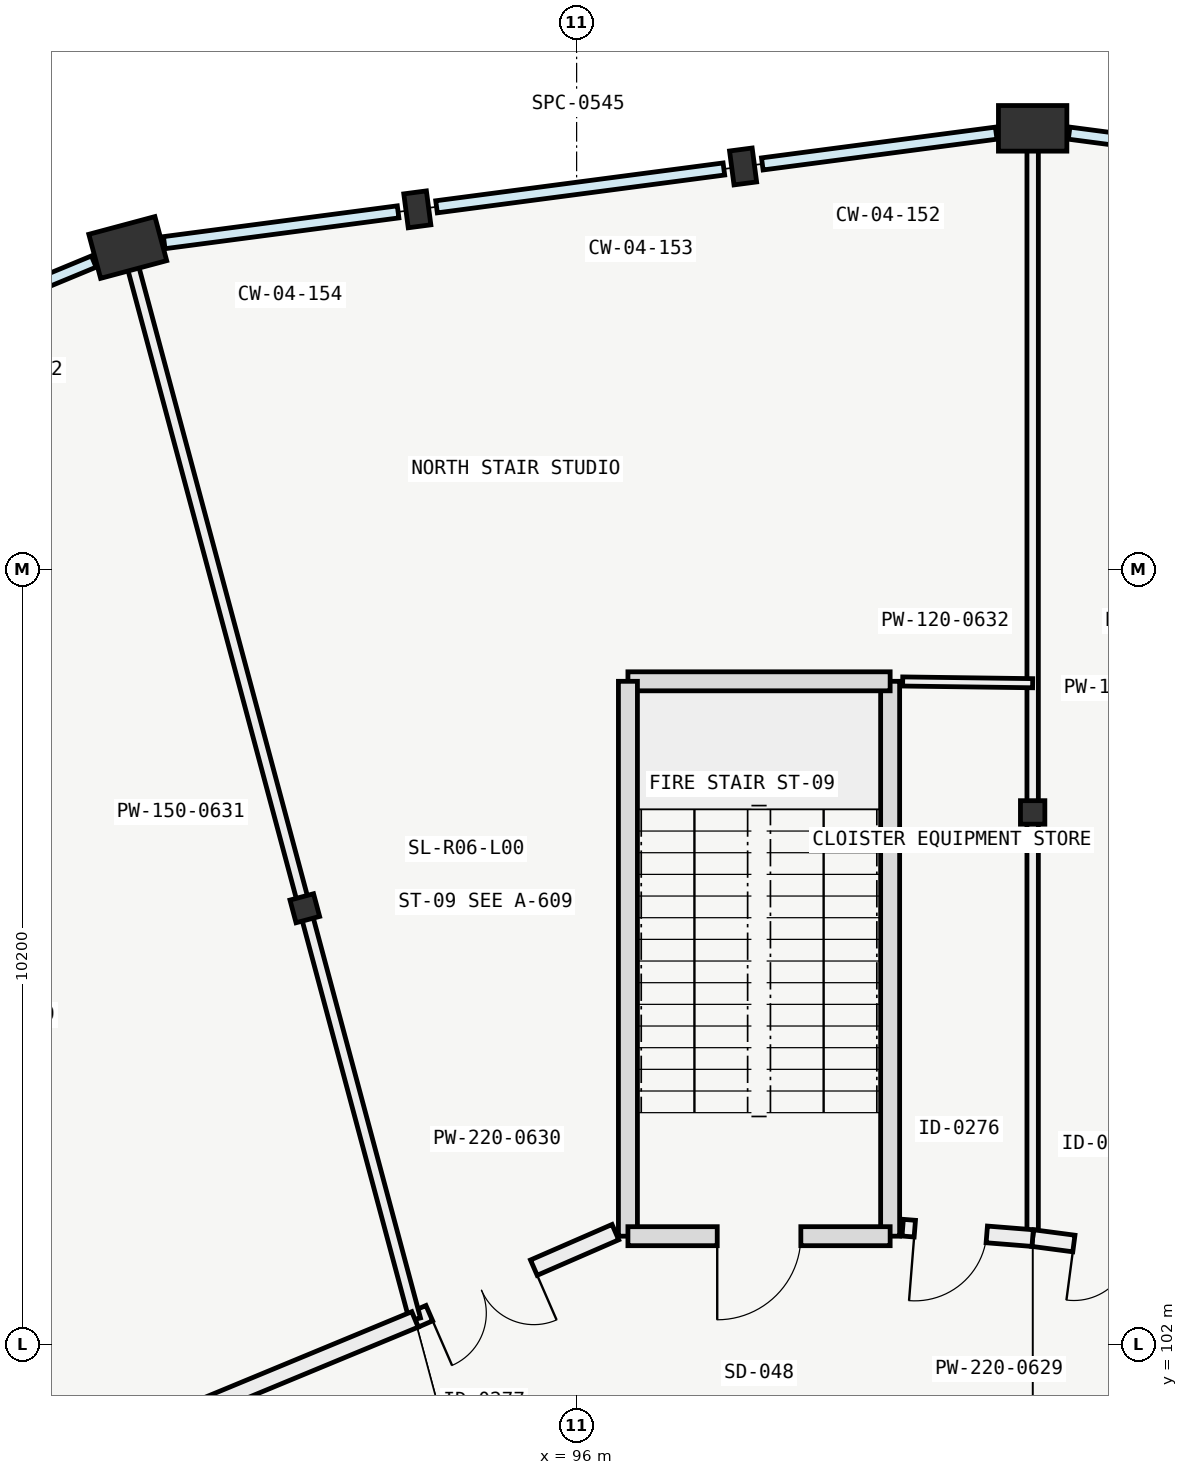
"""IFC4 building model, lengths in metres.
Left out: names, types, materials, properties, quantities, classifications, styles, units other than length and angle.
Written with IfcOpenShell. Run it as: python <this file> out.ifc"""

import sys

from ifc_helpers import new_model, si_unit, direction, frame, frame_2d, origin, origin_2d, place, context, subcontext, project, spatial, rectangle, i_section, extrude, element, fill, save


model = new_model("IFC4")
c1 = context("Model", 3, precision=1e-05, world=origin(), true_north=direction((0.0, 1.0)))
c2 = subcontext(c1, "Body", "Model", "MODEL_VIEW")
j1 = project(units=[si_unit("LENGTHUNIT", "METRE"), si_unit("PLANEANGLEUNIT", "RADIAN")], contexts=[c1])
p1 = place(None, origin())
s1 = spatial("IfcSite", under=j1, at=p1, CompositionType="ELEMENT")
p2 = place(p1, origin())
s2 = spatial("IfcBuilding", under=s1, at=p2, CompositionType="ELEMENT")
p3 = place(p2, origin())
s3 = spatial("IfcBuildingStorey", under=s2, at=p3, CompositionType="ELEMENT", Elevation=0.0)
p4 = place(p3, frame((102.0, 109.0, -0.4), z_axis=(0.0, 0.0, 1.0), x_axis=(0.0, 1.0, 0.0)))
e1 = element("IfcColumn", 1, at=p4, inside=s3, PredefinedType="COLUMN", context=c2, shape_type="SweptSolid", body=[
    extrude(i_section(OverallWidth=0.309, OverallDepth=0.321, WebThickness=0.014, FlangeThickness=0.022, FilletRadius=0.017, at=origin_2d()), origin(), (0.0, 0.0, 1.0), 5.8),
])
p5 = place(p3, frame((102.0, 118.0, -0.4), z_axis=(0.0, 0.0, 1.0), x_axis=(0.0, 1.0, 0.0)))
e2 = element("IfcColumn", 2, at=p5, inside=s3, PredefinedType="COLUMN", context=c2, shape_type="SweptSolid", body=[
    extrude(rectangle(XDim=0.6, YDim=0.9, at=origin_2d()), origin(), (0.0, 0.0, 1.0), 5.8),
])
p6 = place(p3, frame((92.424, 107.739, -0.4), z_axis=(0.0, 0.0, 1.0), x_axis=(-0.258819045103, 0.965925826289, 0.0)))
e3 = element("IfcColumn", 3, at=p6, inside=s3, PredefinedType="COLUMN", context=c2, shape_type="SweptSolid", body=[
    extrude(i_section(OverallWidth=0.309, OverallDepth=0.321, WebThickness=0.014, FlangeThickness=0.022, FilletRadius=0.017, at=origin_2d()), origin(), (0.0, 0.0, 1.0), 5.8),
])
p7 = place(p3, frame((90.094, 116.433, -0.4), z_axis=(0.0, 0.0, 1.0), x_axis=(-0.258819045103, 0.965925826289, 0.0)))
e4 = element("IfcColumn", 4, at=p7, inside=s3, PredefinedType="COLUMN", context=c2, shape_type="SweptSolid", body=[
    extrude(rectangle(XDim=0.6, YDim=0.9, at=origin_2d()), origin(), (0.0, 0.0, 1.0), 5.8),
])
for number, where, z_axis, x_axis in (
    (5, (98.19, 117.498, -0.4), (0.0, 0.0, 1.0), (0.991, 0.131, 0.0)),
    (6, (93.904, 116.934, -0.4), (0.0, 0.0, 1.0), (0.991, 0.131, 0.0)),
):
    element("IfcColumn", number, at=place(p3, frame(where, z_axis=z_axis, x_axis=x_axis)), inside=s3, PredefinedType="PILASTER", context=c2, shape_type="SweptSolid", body=[
        extrude(rectangle(XDim=0.3, YDim=0.45, at=origin_2d()), origin(), (0.0, 0.0, 1.0), 5.8),
    ])
p8 = place(p3, frame((100.125, 103.425, -0.4), z_axis=(0.0, 0.0, 1.0), x_axis=(0.0, 1.0, 0.0)))
e7 = element("IfcWall", 7, at=p8, inside=s3, PredefinedType="SOLIDWALL", context=c2, shape_type="SweptSolid", body=[
    extrude(rectangle(XDim=7.3, YDim=0.25, at=frame_2d((3.65, 0.0))), origin(), (0.0, 0.0, 1.0), 5.52),
])
p9 = place(p3, frame((100.125, 110.725, -0.4), z_axis=(0.0, 0.0, 1.0), x_axis=(-1.0, 0.0, 0.0)))
e8 = element("IfcWall", 8, at=p9, inside=s3, PredefinedType="SOLIDWALL", context=c2, shape_type="SweptSolid", body=[
    extrude(rectangle(XDim=3.45, YDim=0.25, at=frame_2d((1.725, 0.0))), origin(), (0.0, 0.0, 1.0), 5.52),
])
p10 = place(p3, frame((96.675, 110.725, -0.4), z_axis=(0.0, 0.0, 1.0), x_axis=(0.0, -1.0, 0.0)))
e9 = element("IfcWall", 9, at=p10, inside=s3, PredefinedType="SOLIDWALL", context=c2, shape_type="SweptSolid", body=[
    extrude(rectangle(XDim=7.3, YDim=0.25, at=frame_2d((3.65, 0.0))), origin(), (0.0, 0.0, 1.0), 5.52),
])
p11 = place(p3, frame((100.125, 103.425, -0.4), z_axis=(0.0, 0.0, 1.0), x_axis=(-1.0, 0.0, 0.0)))
e10 = element("IfcWall", 10, at=p11, inside=s3, PredefinedType="SOLIDWALL", context=c2, shape_type="SweptSolid", body=[
    extrude(rectangle(XDim=3.45, YDim=0.25, at=frame_2d((1.725, 0.0))), origin(), (0.0, 0.0, 1.0), 5.52),
])
p12 = place(p11, frame((1.175, 0.0, 0.4)))
e11 = element("IfcOpeningElement", 11, at=p12, cuts=e10, PredefinedType="OPENING", context=c2, shape_type="SweptSolid", body=[
    extrude(rectangle(XDim=1.1, YDim=2.2, at=frame_2d((0.55, 1.1))), frame((0.0, 0.135, 0.0), z_axis=(0.0, -1.0, 0.0), x_axis=(1.0, 0.0, 0.0)), (0.0, 0.0, 1.0), 0.27),
])
p13 = place(p3, frame((102.0, 103.4, 0.0), z_axis=(0.0, 0.0, 1.0), x_axis=(0.0, 1.0, 0.0)))
e12 = element("IfcWall", 12, at=p13, inside=s3, PredefinedType="PARTITIONING", context=c2, shape_type="SweptSolid", body=[
    extrude(rectangle(XDim=14.48, YDim=0.15, at=frame_2d((7.24, 0.0))), origin(), (0.0, 0.0, 1.0), 4.567),
])
p14 = place(p3, frame((110.127, 102.33, 0.0), z_axis=(0.0, 0.0, 1.0), x_axis=(-0.991446589332, 0.130513066404, 0.0)))
e13 = element("IfcWall", 13, at=p14, inside=s3, PredefinedType="PARTITIONING", context=c2, shape_type="SweptSolid", body=[
    extrude(rectangle(XDim=8.197, YDim=0.22, at=frame_2d((4.099, 0.0))), origin(), (0.0, 0.0, 1.0), 4.567),
])
p15 = place(p14, frame((2.05, 0.0, 0.0)))
e14 = element("IfcOpeningElement", 14, at=p15, cuts=e13, PredefinedType="OPENING", context=c2, shape_type="SweptSolid", body=[
    extrude(rectangle(XDim=0.9, YDim=2.05, at=frame_2d((0.45, 1.025))), frame((0.0, 0.12, 0.0), z_axis=(0.0, -1.0, 0.0), x_axis=(1.0, 0.0, 0.0)), (0.0, 0.0, 1.0), 0.24),
])
p16 = place(p14, frame((6.15, 0.0, 0.0)))
e15 = element("IfcOpeningElement", 15, at=p16, cuts=e13, PredefinedType="OPENING", context=c2, shape_type="SweptSolid", body=[
    extrude(rectangle(XDim=1.5, YDim=2.2, at=frame_2d((0.75, 1.1))), frame((0.0, 0.12, 0.0), z_axis=(0.0, -1.0, 0.0), x_axis=(1.0, 0.0, 0.0)), (0.0, 0.0, 1.0), 0.24),
])
p17 = place(p3, frame((102.0, 103.4, 0.0), z_axis=(0.0, 0.0, 1.0), x_axis=(-0.996807580938, 0.07984138391, 0.0)))
e16 = element("IfcWall", 16, at=p17, inside=s3, PredefinedType="PARTITIONING", context=c2, shape_type="SweptSolid", body=[
    extrude(rectangle(XDim=1.715, YDim=0.22, at=frame_2d((0.858, 0.0))), origin(), (0.0, 0.0, 1.0), 4.567),
])
p18 = place(p17, frame((0.605, 0.0, 0.0)))
e17 = element("IfcOpeningElement", 17, at=p18, cuts=e16, PredefinedType="OPENING", context=c2, shape_type="SweptSolid", body=[
    extrude(rectangle(XDim=0.95, YDim=2.1, at=frame_2d((0.475, 1.05))), frame((0.0, 0.12, 0.0), z_axis=(0.0, -1.0, 0.0), x_axis=(1.0, 0.0, 0.0)), (0.0, 0.0, 1.0), 0.24),
])
p19 = place(p3, frame((96.51, 103.478, 0.0), z_axis=(0.0, 0.0, 1.0), x_axis=(-0.916855346374, -0.399219580964, 0.0)))
e18 = element("IfcWall", 18, at=p19, inside=s3, PredefinedType="PARTITIONING", context=c2, shape_type="SweptSolid", body=[
    extrude(rectangle(XDim=2.876, YDim=0.22, at=frame_2d((1.438, 0.0))), origin(), (0.0, 0.0, 1.0), 4.567),
])
p20 = place(p19, frame((1.17, 0.0, 0.0)))
e19 = element("IfcOpeningElement", 19, at=p20, cuts=e18, PredefinedType="OPENING", context=c2, shape_type="SweptSolid", body=[
    extrude(rectangle(XDim=1.5, YDim=2.2, at=frame_2d((0.75, 1.1))), frame((0.0, 0.12, 0.0), z_axis=(0.0, -1.0, 0.0), x_axis=(1.0, 0.0, 0.0)), (0.0, 0.0, 1.0), 0.24),
])
p21 = place(p3, frame((93.873, 102.33, 0.0), z_axis=(0.0, 0.0, 1.0), x_axis=(-0.258810530041, 0.965928107853, 0.0)))
e20 = element("IfcWall", 20, at=p21, inside=s3, PredefinedType="PARTITIONING", context=c2, shape_type="SweptSolid", body=[
    extrude(rectangle(XDim=14.48, YDim=0.15, at=frame_2d((7.24, 0.0))), origin(), (0.0, 0.0, 1.0), 4.567),
])
p22 = place(p3, frame((100.29, 110.723, 0.0), z_axis=(0.0, 0.0, 1.0), x_axis=(0.999909951855, -0.013419693814, 0.0)))
e21 = element("IfcWall", 21, at=p22, inside=s3, PredefinedType="PARTITIONING", context=c2, shape_type="SweptSolid", body=[
    extrude(rectangle(XDim=1.71, YDim=0.12, at=frame_2d((0.855, 0.0))), origin(), (0.0, 0.0, 1.0), 4.567),
])
p23 = place(p3, frame((93.873, 102.33, 0.0), z_axis=(0.0, 0.0, 1.0), x_axis=(-0.923874167149, -0.382696385238, 0.0)))
e22 = element("IfcWall", 22, at=p23, inside=s3, PredefinedType="PARTITIONING", context=c2, shape_type="SweptSolid", body=[
    extrude(rectangle(XDim=8.197, YDim=0.22, at=frame_2d((4.099, 0.0))), origin(), (0.0, 0.0, 1.0), 4.567),
])
p24 = place(p23, frame((4.1, 0.0, 0.0)))
e23 = element("IfcOpeningElement", 23, at=p24, cuts=e22, PredefinedType="OPENING", context=c2, shape_type="SweptSolid", body=[
    extrude(rectangle(XDim=1.5, YDim=2.2, at=frame_2d((0.75, 1.1))), frame((0.0, 0.12, 0.0), z_axis=(0.0, -1.0, 0.0), x_axis=(1.0, 0.0, 0.0)), (0.0, 0.0, 1.0), 0.24),
])
p25 = place(p12, origin())
e24 = element("IfcDoor", 24, at=p25, inside=s3, OperationType="SINGLE_SWING_RIGHT", PredefinedType="DOOR", context=c2, shape_type="SweptSolid", body=[
    extrude(rectangle(XDim=1.1, YDim=2.2, at=frame_2d((0.55, 1.1))), frame((0.0, 0.025, 0.0), z_axis=(0.0, -1.0, 0.0), x_axis=(1.0, 0.0, 0.0)), (0.0, 0.0, 1.0), 0.05),
])
fill(e11, e24)
p26 = place(p16, origin())
e25 = element("IfcDoor", 25, at=p26, inside=s3, OperationType="DOUBLE_DOOR_SINGLE_SWING", PredefinedType="DOOR", context=c2, shape_type="SweptSolid", body=[
    extrude(rectangle(XDim=1.5, YDim=2.2, at=frame_2d((0.75, 1.1))), frame((0.0, 0.025, 0.0), z_axis=(0.0, -1.0, 0.0), x_axis=(1.0, 0.0, 0.0)), (0.0, 0.0, 1.0), 0.05),
])
fill(e15, e25)
p27 = place(p18, origin())
e26 = element("IfcDoor", 26, at=p27, inside=s3, OperationType="SINGLE_SWING_RIGHT", PredefinedType="DOOR", context=c2, shape_type="SweptSolid", body=[
    extrude(rectangle(XDim=0.95, YDim=2.1, at=frame_2d((0.475, 1.05))), frame((0.0, 0.025, 0.0), z_axis=(0.0, -1.0, 0.0), x_axis=(1.0, 0.0, 0.0)), (0.0, 0.0, 1.0), 0.05),
])
fill(e17, e26)
p28 = place(p20, origin())
e27 = element("IfcDoor", 27, at=p28, inside=s3, OperationType="DOUBLE_DOOR_SINGLE_SWING", PredefinedType="DOOR", context=c2, shape_type="SweptSolid", body=[
    extrude(rectangle(XDim=1.5, YDim=2.2, at=frame_2d((0.75, 1.1))), frame((0.0, 0.025, 0.0), z_axis=(0.0, -1.0, 0.0), x_axis=(1.0, 0.0, 0.0)), (0.0, 0.0, 1.0), 0.05),
])
fill(e19, e27)
save(model, sys.argv[1])
